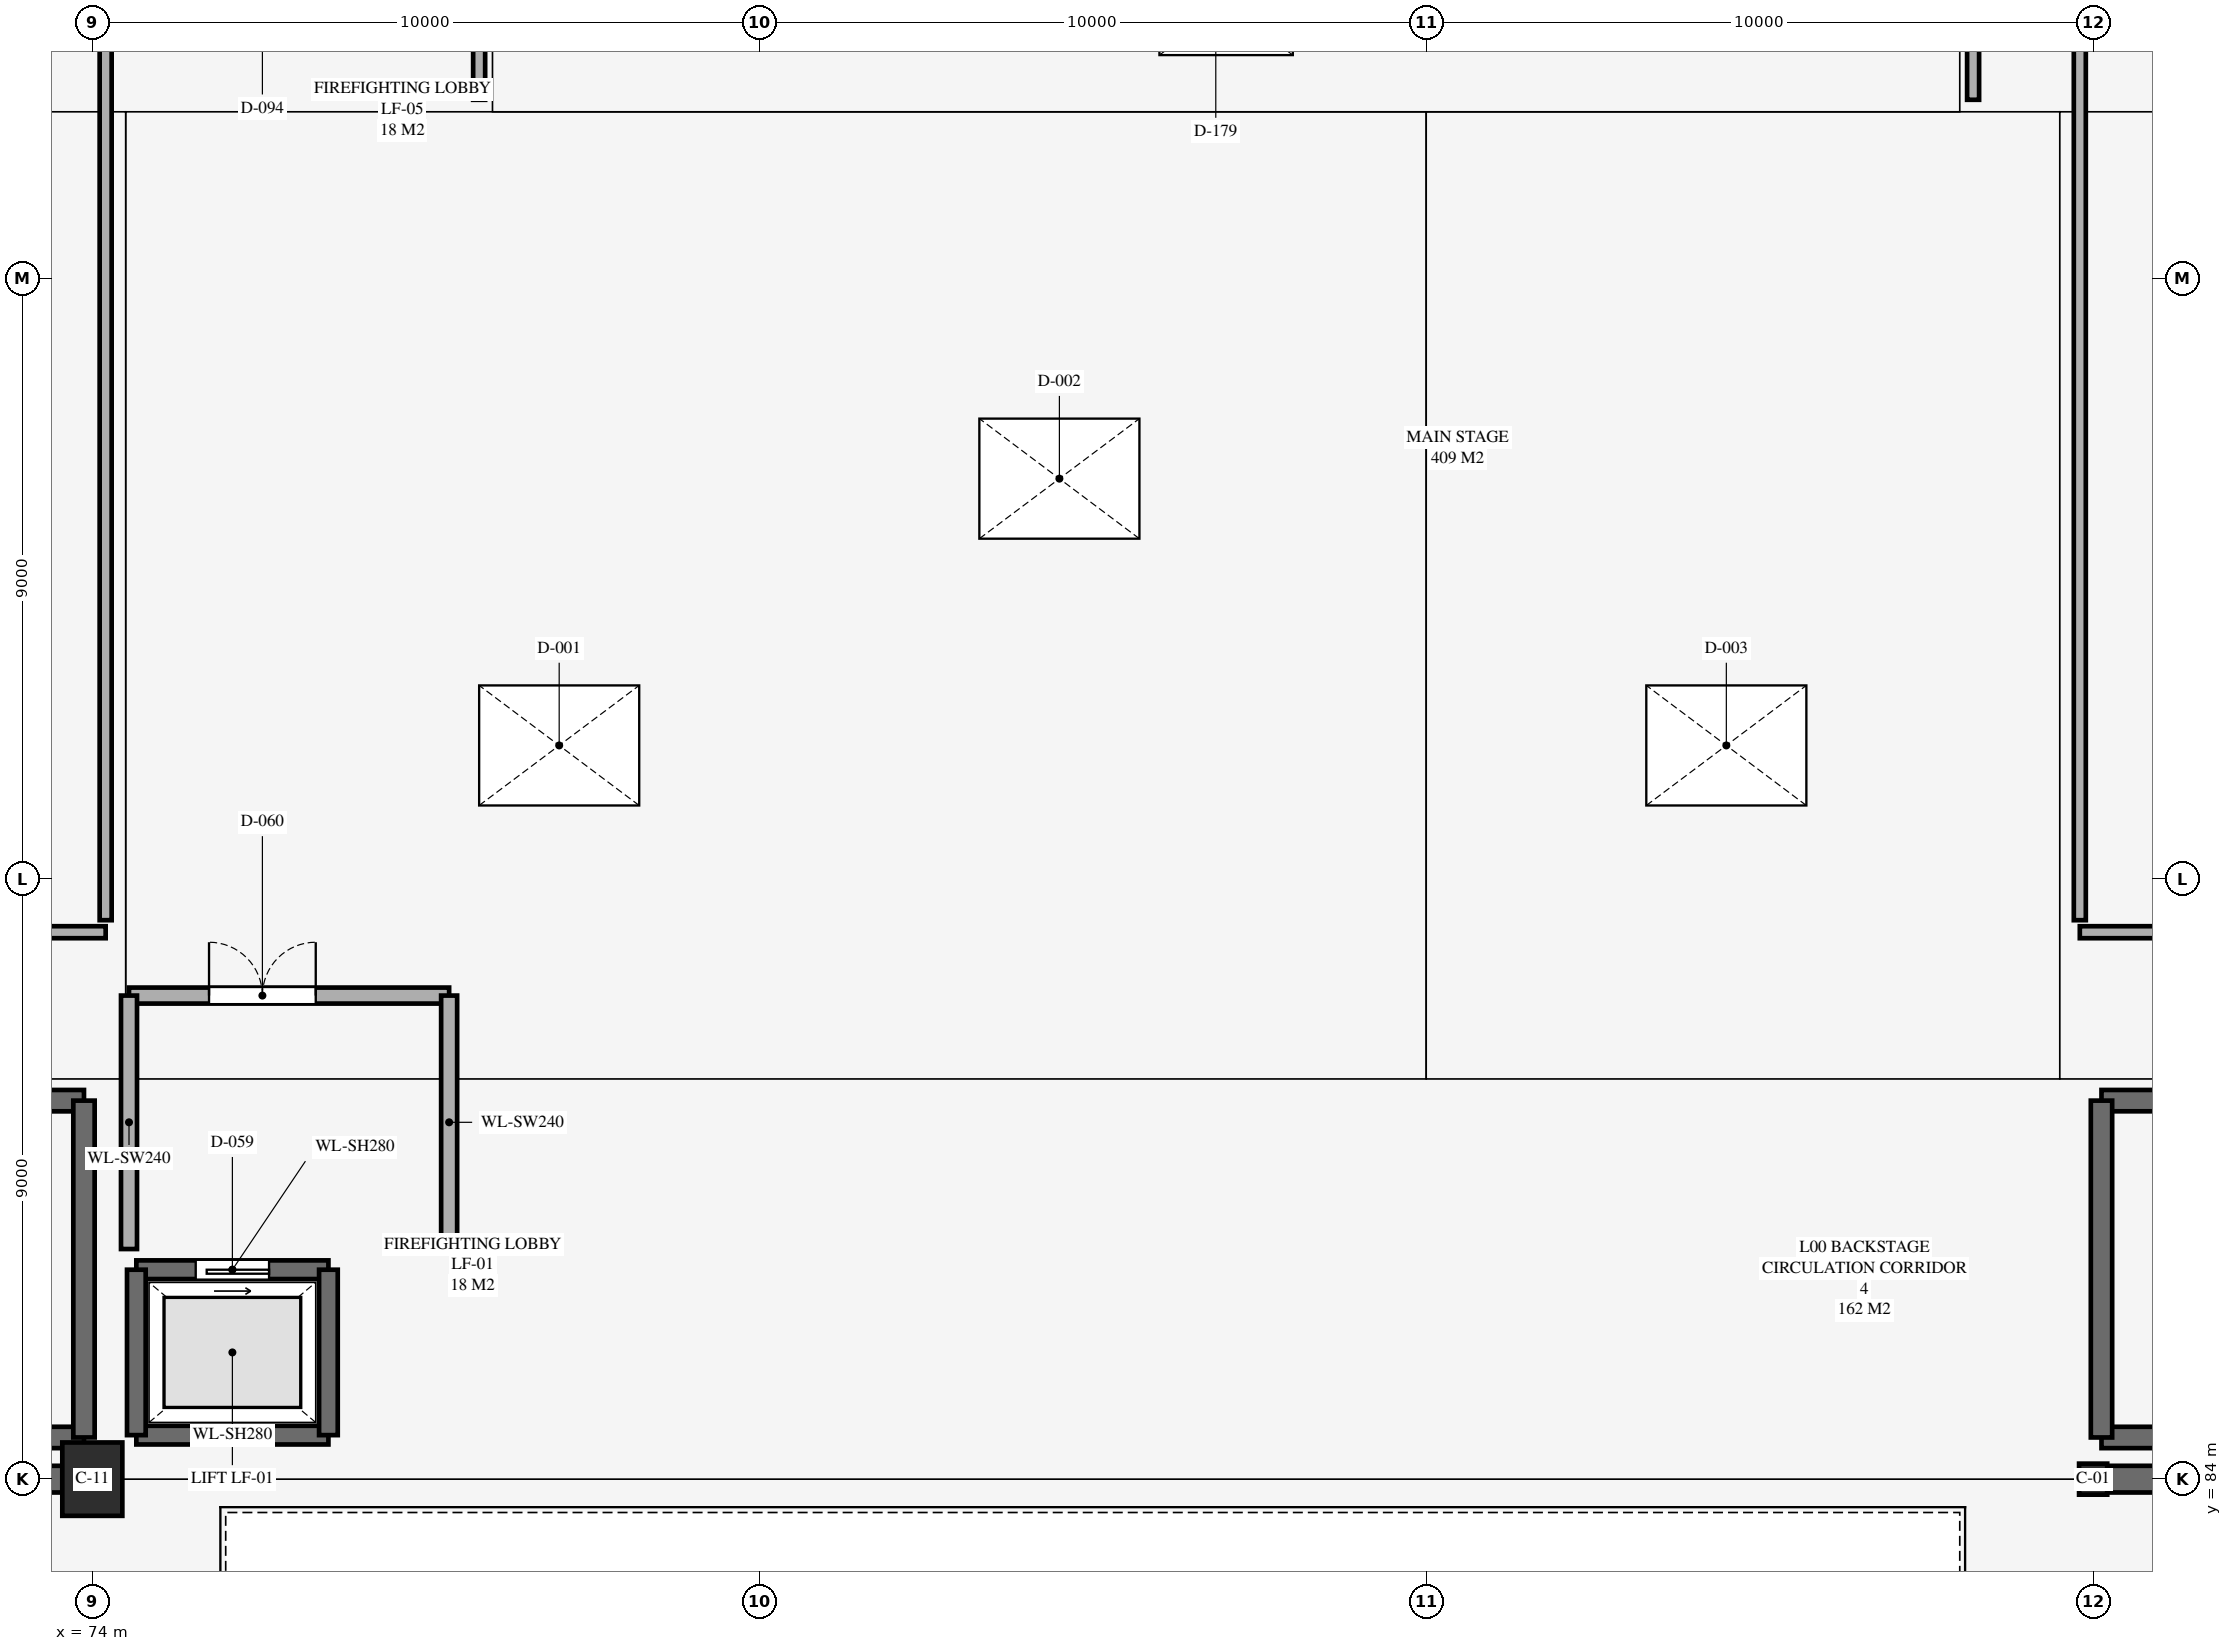
"""IFC4 building model, lengths in metres.
Left out: names, types, materials, properties, quantities, classifications, styles, units other than length and angle.
Written with IfcOpenShell. Run it as: python <this file> out.ifc"""

import sys

from ifc_helpers import new_model, si_unit, direction, frame, frame_2d, origin, origin_2d, place, context, subcontext, project, spatial, rectangle, i_section, extrude, element, fill, save


model = new_model("IFC4")
c1 = context("Model", 3, precision=1e-05, world=origin(), true_north=direction((0.0, 1.0)))
c2 = subcontext(c1, "Body", "Model", "MODEL_VIEW")
j1 = project(units=[si_unit("LENGTHUNIT", "METRE"), si_unit("PLANEANGLEUNIT", "RADIAN")], contexts=[c1])
p1 = place(None, origin())
s1 = spatial("IfcSite", under=j1, at=p1, CompositionType="ELEMENT")
p2 = place(p1, origin())
s2 = spatial("IfcBuilding", under=s1, at=p2, CompositionType="ELEMENT")
p3 = place(p2, origin())
s3 = spatial("IfcBuildingStorey", under=s2, at=p3, CompositionType="ELEMENT", Elevation=0.0)
p4 = place(p3, frame((74.0, 84.0, 0.0), z_axis=(0.0, 0.0, 1.0), x_axis=(1.0, 0.0, 0.0)))
e1 = element("IfcColumn", 1, at=p4, inside=s3, PredefinedType="COLUMN", context=c2, shape_type="SweptSolid", body=[
    extrude(rectangle(XDim=0.9, YDim=1.1, at=origin_2d()), origin(), (0.0, 0.0, 1.0), 5.0),
])
p5 = place(p3, frame((104.0, 84.0, 0.0), z_axis=(0.0, 0.0, 1.0), x_axis=(1.0, 0.0, 0.0)))
e2 = element("IfcColumn", 2, at=p5, inside=s3, PredefinedType="COLUMN", context=c2, shape_type="SweptSolid", body=[
    extrude(i_section(OverallWidth=0.422, OverallDepth=0.465, WebThickness=0.045, FlangeThickness=0.073, FilletRadius=0.02, at=origin_2d()), origin(), (0.0, 0.0, 1.0), 5.0),
])
p6 = place(p3, frame((64.625, 84.625, 0.0), z_axis=(0.0, 0.0, 1.0), x_axis=(1.0, 0.0, 0.0)))
e3 = element("IfcWall", 3, at=p6, inside=s3, PredefinedType="SHEAR", context=c2, shape_type="SweptSolid", body=[
    extrude(rectangle(XDim=9.25, YDim=0.32, at=frame_2d((4.625, 0.0))), origin(), (0.0, 0.0, 1.0), 4.675),
])
p7 = place(p3, frame((73.875, 89.675, 0.0), z_axis=(0.0, 0.0, 1.0), x_axis=(-1.0, 0.0, 0.0)))
e4 = element("IfcWall", 4, at=p7, inside=s3, PredefinedType="SHEAR", context=c2, shape_type="SweptSolid", body=[
    extrude(rectangle(XDim=9.25, YDim=0.32, at=frame_2d((4.625, 0.0))), origin(), (0.0, 0.0, 1.0), 4.675),
])
p8 = place(p7, frame((7.2, 0.0, 0.0)))
e5 = element("IfcOpeningElement", 5, at=p8, cuts=e4, PredefinedType="OPENING", context=c2, shape_type="SweptSolid", body=[
    extrude(rectangle(XDim=1.15, YDim=2.2, at=frame_2d((0.575, 1.1))), frame((0.0, 0.17, 0.0), z_axis=(0.0, -1.0, 0.0), x_axis=(1.0, 0.0, 0.0)), (0.0, 0.0, 1.0), 0.34),
])
p9 = place(p3, frame((73.875, 84.625, 0.0), z_axis=(0.0, 0.0, 1.0), x_axis=(0.0, 1.0, 0.0)))
e6 = element("IfcWall", 6, at=p9, inside=s3, PredefinedType="SHEAR", context=c2, shape_type="SweptSolid", body=[
    extrude(rectangle(XDim=5.05, YDim=0.32, at=frame_2d((2.525, 0.0))), origin(), (0.0, 0.0, 1.0), 4.675),
])
p10 = place(p3, frame((104.125, 84.625, 0.0), z_axis=(0.0, 0.0, 1.0), x_axis=(1.0, 0.0, 0.0)))
e7 = element("IfcWall", 7, at=p10, inside=s3, PredefinedType="SHEAR", context=c2, shape_type="SweptSolid", body=[
    extrude(rectangle(XDim=9.25, YDim=0.32, at=frame_2d((4.625, 0.0))), origin(), (0.0, 0.0, 1.0), 4.675),
])
p11 = place(p3, frame((113.375, 89.675, 0.0), z_axis=(0.0, 0.0, 1.0), x_axis=(-1.0, 0.0, 0.0)))
e8 = element("IfcWall", 8, at=p11, inside=s3, PredefinedType="SHEAR", context=c2, shape_type="SweptSolid", body=[
    extrude(rectangle(XDim=9.25, YDim=0.32, at=frame_2d((4.625, 0.0))), origin(), (0.0, 0.0, 1.0), 4.675),
])
p12 = place(p11, frame((7.2, 0.0, 0.0)))
e9 = element("IfcOpeningElement", 9, at=p12, cuts=e8, PredefinedType="OPENING", context=c2, shape_type="SweptSolid", body=[
    extrude(rectangle(XDim=1.15, YDim=2.2, at=frame_2d((0.575, 1.1))), frame((0.0, 0.17, 0.0), z_axis=(0.0, -1.0, 0.0), x_axis=(1.0, 0.0, 0.0)), (0.0, 0.0, 1.0), 0.34),
])
p13 = place(p3, frame((104.125, 89.675, 0.0), z_axis=(0.0, 0.0, 1.0), x_axis=(0.0, -1.0, 0.0)))
e10 = element("IfcWall", 10, at=p13, inside=s3, PredefinedType="SHEAR", context=c2, shape_type="SweptSolid", body=[
    extrude(rectangle(XDim=5.05, YDim=0.32, at=frame_2d((2.525, 0.0))), origin(), (0.0, 0.0, 1.0), 4.675),
])
p14 = place(p3, frame((74.66, 84.66, 0.0), z_axis=(0.0, 0.0, 1.0), x_axis=(1.0, 0.0, 0.0)))
e11 = element("IfcWall", 11, at=p14, inside=s3, PredefinedType="SHEAR", context=c2, shape_type="SweptSolid", body=[
    extrude(rectangle(XDim=2.88, YDim=0.28, at=frame_2d((1.44, 0.0))), origin(), (0.0, 0.0, 1.0), 4.675),
])
p15 = place(p3, frame((77.54, 87.14, 0.0), z_axis=(0.0, 0.0, 1.0), x_axis=(-1.0, 0.0, 0.0)))
e12 = element("IfcWall", 12, at=p15, inside=s3, PredefinedType="SHEAR", context=c2, shape_type="SweptSolid", body=[
    extrude(rectangle(XDim=2.88, YDim=0.28, at=frame_2d((1.44, 0.0))), origin(), (0.0, 0.0, 1.0), 4.675),
])
p16 = place(p15, frame((0.89, 0.0, 0.0)))
e13 = element("IfcOpeningElement", 13, at=p16, cuts=e12, PredefinedType="OPENING", context=c2, shape_type="SweptSolid", body=[
    extrude(rectangle(XDim=1.1, YDim=2.2, at=frame_2d((0.55, 1.1))), frame((0.0, 0.15, 0.0), z_axis=(0.0, -1.0, 0.0), x_axis=(1.0, 0.0, 0.0)), (0.0, 0.0, 1.0), 0.3),
])
for number, where, z_axis, x_axis in (
    (14, (74.66, 87.14, 0.0), (0.0, 0.0, 1.0), (0.0, -1.0, 0.0)),
    (15, (77.54, 84.66, 0.0), (0.0, 0.0, 1.0), (0.0, 1.0, 0.0)),
):
    element("IfcWall", number, at=place(p3, frame(where, z_axis=z_axis, x_axis=x_axis)), inside=s3, PredefinedType="SHEAR", context=c2, shape_type="SweptSolid", body=[
        extrude(rectangle(XDim=2.48, YDim=0.28, at=frame_2d((1.24, 0.0))), origin(), (0.0, 0.0, 1.0), 4.675),
    ])
p17 = place(p3, frame((74.55, 91.25, 0.0), z_axis=(0.0, 0.0, 1.0), x_axis=(1.0, 0.0, 0.0)))
e16 = element("IfcWall", 16, at=p17, inside=s3, PredefinedType="SOLIDWALL", context=c2, shape_type="SweptSolid", body=[
    extrude(rectangle(XDim=4.8, YDim=0.24, at=frame_2d((2.4, 0.0))), origin(), (0.0, 0.0, 1.0), 4.675),
])
p18 = place(p17, frame((1.2, 0.0, 0.0)))
e17 = element("IfcOpeningElement", 17, at=p18, cuts=e16, PredefinedType="OPENING", context=c2, shape_type="SweptSolid", body=[
    extrude(rectangle(XDim=1.6, YDim=2.2, at=frame_2d((0.8, 1.1))), frame((0.0, 0.13, 0.0), z_axis=(0.0, -1.0, 0.0), x_axis=(1.0, 0.0, 0.0)), (0.0, 0.0, 1.0), 0.26),
])
for number, where, z_axis, x_axis in (
    (18, (74.55, 91.25, 0.0), (0.0, 0.0, 1.0), (0.0, -1.0, 0.0)),
    (19, (79.35, 87.45, 0.0), (0.0, 0.0, 1.0), (0.0, 1.0, 0.0)),
):
    element("IfcWall", number, at=place(p3, frame(where, z_axis=z_axis, x_axis=x_axis)), inside=s3, PredefinedType="SOLIDWALL", context=c2, shape_type="SweptSolid", body=[
        extrude(rectangle(XDim=3.8, YDim=0.24, at=frame_2d((1.9, 0.0))), origin(), (0.0, 0.0, 1.0), 4.675),
    ])
for number, where, z_axis, x_axis in (
    (20, (64.471, 84.0, 0.0), (0.0, 0.0, 1.0), (1.0, 0.0, 0.0)),
    (21, (104.211, 84.0, 0.0), (0.0, 0.0, 1.0), (1.0, 0.0, 0.0)),
):
    element("IfcWall", number, at=place(p3, frame(where, z_axis=z_axis, x_axis=x_axis)), inside=s3, PredefinedType="SHEAR", context=c2, shape_type="SweptSolid", body=[
        extrude(rectangle(XDim=9.079, YDim=0.4, at=frame_2d((4.54, 0.0))), origin(), (0.0, 0.0, 1.0), 4.675),
    ])
p19 = place(p3, frame((64.14, 92.2, 0.0), z_axis=(0.0, 0.0, 1.0), x_axis=(1.0, 0.0, 0.0)))
e22 = element("IfcWall", 22, at=p19, inside=s3, PredefinedType="PARTITIONING", context=c2, shape_type="SweptSolid", body=[
    extrude(rectangle(XDim=10.06, YDim=0.18, at=frame_2d((5.03, 0.0))), origin(), (0.0, 0.0, 1.0), 4.675),
])
p20 = place(p19, frame((4.155, 0.0, 0.0)))
e23 = element("IfcOpeningElement", 23, at=p20, cuts=e22, PredefinedType="OPENING", context=c2, shape_type="SweptSolid", body=[
    extrude(rectangle(XDim=1.75, YDim=2.2, at=frame_2d((0.875, 1.1))), frame((0.0, 0.1, 0.0), z_axis=(0.0, -1.0, 0.0), x_axis=(1.0, 0.0, 0.0)), (0.0, 0.0, 1.0), 0.2),
])
p21 = place(p3, frame((74.2, 92.38, 0.0), z_axis=(0.0, 0.0, 1.0), x_axis=(0.0, 1.0, 0.0)))
e24 = element("IfcWall", 24, at=p21, inside=s3, PredefinedType="PARTITIONING", context=c2, shape_type="SweptSolid", body=[
    extrude(rectangle(XDim=14.64, YDim=0.18, at=frame_2d((7.32, 0.0))), origin(), (0.0, 0.0, 1.0), 3.573),
])
p22 = place(p3, frame((103.8, 92.2, 0.0), z_axis=(0.0, 0.0, 1.0), x_axis=(1.0, 0.0, 0.0)))
e25 = element("IfcWall", 25, at=p22, inside=s3, PredefinedType="PARTITIONING", context=c2, shape_type="SweptSolid", body=[
    extrude(rectangle(XDim=10.06, YDim=0.18, at=frame_2d((5.03, 0.0))), origin(), (0.0, 0.0, 1.0), 4.675),
])
p23 = place(p22, frame((4.155, 0.0, 0.0)))
e26 = element("IfcOpeningElement", 26, at=p23, cuts=e25, PredefinedType="OPENING", context=c2, shape_type="SweptSolid", body=[
    extrude(rectangle(XDim=1.75, YDim=2.2, at=frame_2d((0.875, 1.1))), frame((0.0, 0.1, 0.0), z_axis=(0.0, -1.0, 0.0), x_axis=(1.0, 0.0, 0.0)), (0.0, 0.0, 1.0), 0.2),
])
p24 = place(p3, frame((103.8, 107.02, 0.0), z_axis=(0.0, 0.0, 1.0), x_axis=(0.0, -1.0, 0.0)))
e27 = element("IfcWall", 27, at=p24, inside=s3, PredefinedType="PARTITIONING", context=c2, shape_type="SweptSolid", body=[
    extrude(rectangle(XDim=14.64, YDim=0.18, at=frame_2d((7.32, 0.0))), origin(), (0.0, 0.0, 1.0), 3.573),
])
for number, where, z_axis, x_axis in (
    (28, (79.8, 107.42, 0.0), (0.0, 0.0, 1.0), (0.0, -1.0, 0.0)),
    (29, (102.2, 104.68, 0.0), (0.0, 0.0, 1.0), (0.0, 1.0, 0.0)),
):
    element("IfcWall", number, at=place(p3, frame(where, z_axis=z_axis, x_axis=x_axis)), inside=s3, PredefinedType="PARTITIONING", context=c2, shape_type="SweptSolid", body=[
        extrude(rectangle(XDim=2.74, YDim=0.18, at=frame_2d((1.37, 0.0))), origin(), (0.0, 0.0, 1.0), 4.675),
    ])
p25 = place(p3, origin())
p26 = place(p25, frame((81.0, 95.0, 0.0)))
p27 = place(p26, frame((0.0, 0.0, 0.18)))
e30 = element("IfcDoor", 30, at=p27, inside=s3, OperationType="SINGLE_SWING_LEFT", PredefinedType="TRAPDOOR", context=c2, shape_type="SweptSolid", body=[
    extrude(rectangle(XDim=2.4, YDim=1.8, at=origin_2d()), origin(), (0.0, 0.0, 1.0), 0.05),
])
p28 = place(p25, frame((88.5, 99.0, 0.0)))
p29 = place(p28, frame((0.0, 0.0, 0.18)))
e31 = element("IfcDoor", 31, at=p29, inside=s3, OperationType="SINGLE_SWING_LEFT", PredefinedType="TRAPDOOR", context=c2, shape_type="SweptSolid", body=[
    extrude(rectangle(XDim=2.4, YDim=1.8, at=origin_2d()), origin(), (0.0, 0.0, 1.0), 0.05),
])
p30 = place(p3, origin())
p31 = place(p30, frame((98.5, 95.0, 0.0)))
p32 = place(p31, frame((0.0, 0.0, 0.18)))
e32 = element("IfcDoor", 32, at=p32, inside=s3, OperationType="SINGLE_SWING_LEFT", PredefinedType="TRAPDOOR", context=c2, shape_type="SweptSolid", body=[
    extrude(rectangle(XDim=2.4, YDim=1.8, at=origin_2d()), origin(), (0.0, 0.0, 1.0), 0.05),
])
p33 = place(p3, origin())
p34 = place(p33, frame((91.0, 106.1, 0.0)))
p35 = place(p34, frame((0.0, 0.0, 0.18)))
e33 = element("IfcDoor", 33, at=p35, inside=s3, OperationType="SINGLE_SWING_RIGHT", PredefinedType="TRAPDOOR", context=c2, shape_type="SweptSolid", body=[
    extrude(rectangle(XDim=2.0, YDim=1.5, at=origin_2d()), origin(), (0.0, 0.0, 1.0), 0.05),
])
p36 = place(p16, origin())
e34 = element("IfcDoor", 34, at=p36, inside=s3, OperationType="SLIDING_TO_LEFT", PredefinedType="DOOR", context=c2, shape_type="SweptSolid", body=[
    extrude(rectangle(XDim=1.1, YDim=2.2, at=frame_2d((0.55, 1.1))), frame((0.0, 0.025, 0.0), z_axis=(0.0, -1.0, 0.0), x_axis=(1.0, 0.0, 0.0)), (0.0, 0.0, 1.0), 0.05),
])
fill(e13, e34)
p37 = place(p18, origin())
e35 = element("IfcDoor", 35, at=p37, inside=s3, OperationType="DOUBLE_DOOR_SINGLE_SWING", PredefinedType="DOOR", context=c2, shape_type="SweptSolid", body=[
    extrude(rectangle(XDim=1.6, YDim=2.2, at=frame_2d((0.8, 1.1))), frame((0.0, 0.025, 0.0), z_axis=(0.0, -1.0, 0.0), x_axis=(1.0, 0.0, 0.0)), (0.0, 0.0, 1.0), 0.05),
])
fill(e17, e35)
save(model, sys.argv[1])
